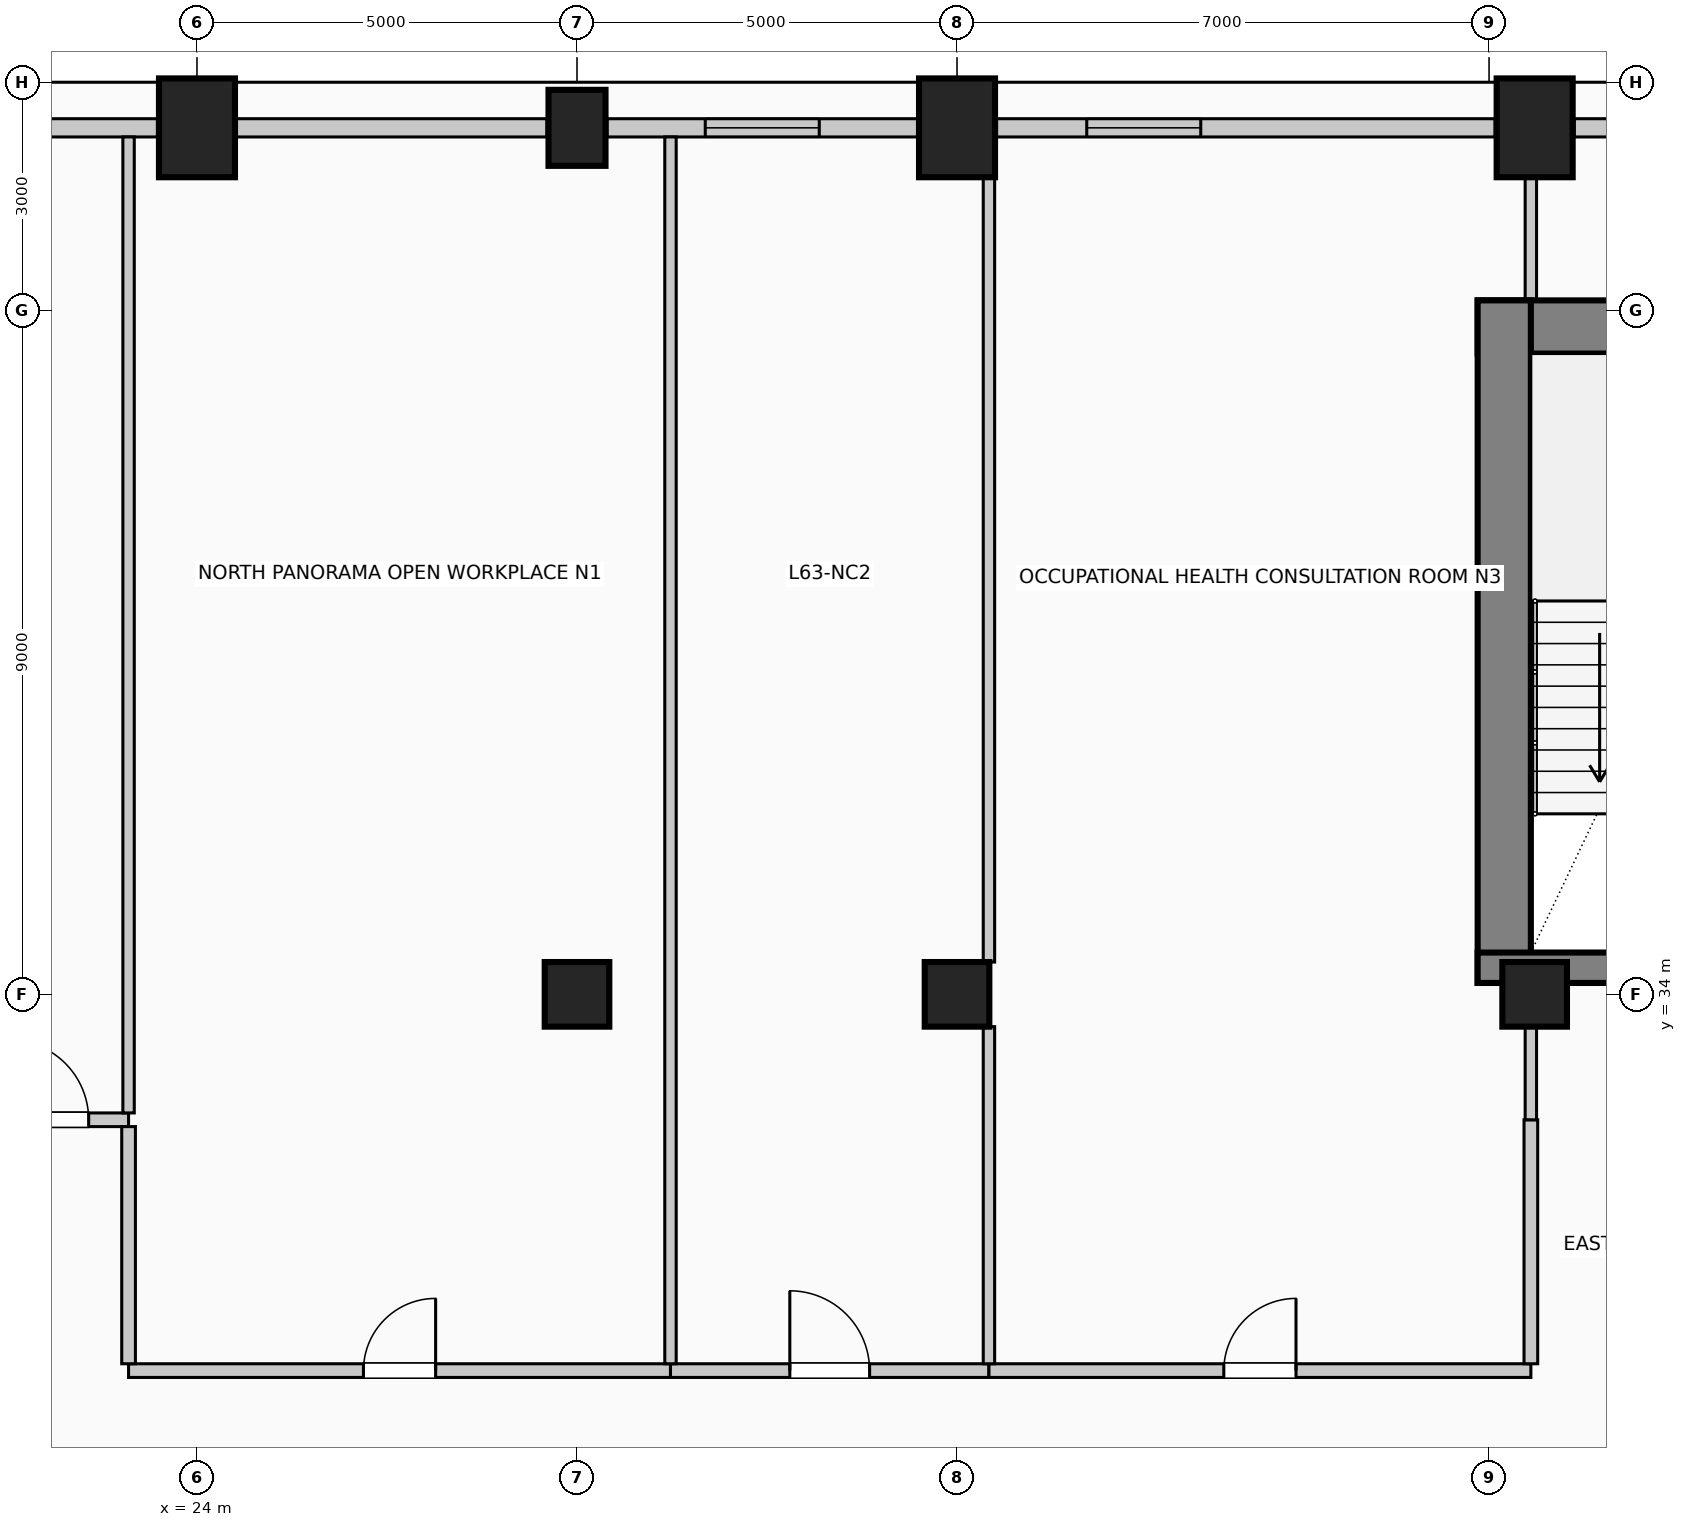
"""IFC4 building model, lengths in metres.
Left out: names, types, materials, properties, quantities, classifications, styles, units other than length and angle.
Written with IfcOpenShell. Run it as: python <this file> out.ifc"""

import sys

from ifc_helpers import new_model, si_unit, direction, frame, frame_2d, origin, origin_2d, place, context, subcontext, project, spatial, rectangle, circle, extrude, element, fill, save


model = new_model("IFC4")
c1 = context("Model", 3, precision=1e-05, world=origin(), true_north=direction((0.0, 1.0)))
c2 = subcontext(c1, "Body", "Model", "MODEL_VIEW")
j1 = project(units=[si_unit("LENGTHUNIT", "METRE"), si_unit("PLANEANGLEUNIT", "RADIAN")], contexts=[c1])
p1 = place(None, origin())
s1 = spatial("IfcSite", under=j1, at=p1, CompositionType="ELEMENT")
p2 = place(p1, origin())
s2 = spatial("IfcBuilding", under=s1, at=p2, CompositionType="ELEMENT")
p3 = place(p2, frame((0.0, 0.0, 260.6)))
s3 = spatial("IfcBuildingStorey", under=s2, at=p3, CompositionType="ELEMENT", Elevation=260.6)
p4 = place(p3, frame((40.85, 42.78, 0.0), z_axis=(0.0, 0.0, 1.0), x_axis=(1.0, 0.0, 0.0)))
e1 = element("IfcWall", 1, at=p4, inside=s3, PredefinedType="SHEAR", context=c2, shape_type="SweptSolid", body=[
    extrude(rectangle(XDim=14.3, YDim=0.7, at=frame_2d((7.15, 0.0))), origin(), (0.0, 0.0, 1.0), 4.0),
])
p5 = place(p3, frame((41.2, 34.15, 0.0), z_axis=(0.0, 0.0, 1.0), x_axis=(0.0, 1.0, 0.0)))
e2 = element("IfcWall", 2, at=p5, inside=s3, PredefinedType="SHEAR", context=c2, shape_type="SweptSolid", body=[
    extrude(rectangle(XDim=8.98, YDim=0.7, at=frame_2d((4.49, 0.0))), origin(), (0.0, 0.0, 1.0), 4.0),
])
p6 = place(p3, frame((40.85, 34.35, 0.0), z_axis=(0.0, 0.0, 1.0), x_axis=(1.0, 0.0, 0.0)))
e3 = element("IfcWall", 3, at=p6, inside=s3, PredefinedType="SHEAR", context=c2, shape_type="SweptSolid", body=[
    extrude(rectangle(XDim=4.86, YDim=0.4, at=frame_2d((2.43, 0.0))), origin(), (0.0, 0.0, 1.0), 4.0),
])
p7 = place(p6, frame((2.4, 0.0, 0.0)))
e4 = element("IfcOpeningElement", 4, at=p7, cuts=e3, PredefinedType="OPENING", context=c2, shape_type="SweptSolid", body=[
    extrude(rectangle(XDim=1.15, YDim=2.2, at=frame_2d((0.575, 1.1))), frame((0.0, 0.21, 0.0), z_axis=(0.0, -1.0, 0.0), x_axis=(1.0, 0.0, 0.0)), (0.0, 0.0, 1.0), 0.42),
])
p8 = place(p3, frame((24.0, 45.4, 0.0), z_axis=(0.0, 0.0, 1.0), x_axis=(1.0, 0.0, 0.0)))
e5 = element("IfcColumn", 5, at=p8, inside=s3, PredefinedType="COLUMN", context=c2, shape_type="SweptSolid", body=[
    extrude(rectangle(XDim=1.0, YDim=1.3, at=origin_2d()), origin(), (0.0, 0.0, 1.0), 4.0),
])
p9 = place(p3, frame((29.0, 45.4, 0.0), z_axis=(0.0, 0.0, 1.0), x_axis=(1.0, 0.0, 0.0)))
e6 = element("IfcColumn", 6, at=p9, inside=s3, PredefinedType="COLUMN", context=c2, shape_type="SweptSolid", body=[
    extrude(rectangle(XDim=0.75, YDim=1.0, at=origin_2d()), origin(), (0.0, 0.0, 1.0), 4.0),
])
for number, where, z_axis, x_axis in (
    (7, (34.0, 45.4, 0.0), (0.0, 0.0, 1.0), (1.0, 0.0, 0.0)),
    (8, (41.6, 45.4, 0.0), (0.0, 0.0, 1.0), (1.0, 0.0, 0.0)),
):
    element("IfcColumn", number, at=place(p3, frame(where, z_axis=z_axis, x_axis=x_axis)), inside=s3, PredefinedType="COLUMN", context=c2, shape_type="SweptSolid", body=[
        extrude(rectangle(XDim=1.0, YDim=1.3, at=origin_2d()), origin(), (0.0, 0.0, 1.0), 4.0),
    ])
for number, where, z_axis, x_axis in (
    (9, (29.0, 34.0, 0.0), (0.0, 0.0, 1.0), (1.0, 0.0, 0.0)),
    (10, (41.6, 34.0, 0.0), (0.0, 0.0, 1.0), (1.0, 0.0, 0.0)),
    (11, (34.0, 34.0, 0.0), (0.0, 0.0, 1.0), (1.0, 0.0, 0.0)),
):
    element("IfcColumn", number, at=place(p3, frame(where, z_axis=z_axis, x_axis=x_axis)), inside=s3, PredefinedType="COLUMN", context=c2, shape_type="SweptSolid", body=[
        extrude(circle(Radius=0.425, at=origin_2d()), origin(), (0.0, 0.0, 1.0), 4.0),
    ])
p10 = place(p3, frame((16.92, 45.4, 0.0), z_axis=(0.0, 0.0, 1.0), x_axis=(1.0, 0.0, 0.0)))
e12 = element("IfcWall", 12, at=p10, inside=s3, PredefinedType="SOLIDWALL", context=c2, shape_type="SweptSolid", body=[
    extrude(rectangle(XDim=6.56, YDim=0.24, at=frame_2d((3.28, 0.0))), origin(), (0.0, 0.0, 1.0), 3.0),
])
p11 = place(p10, frame((1.187, 0.0, 0.42)))
e13 = element("IfcOpeningElement", 13, at=p11, cuts=e12, PredefinedType="OPENING", context=c2, shape_type="SweptSolid", body=[
    extrude(rectangle(XDim=1.5, YDim=2.2, at=frame_2d((0.75, 1.1))), frame((0.0, 0.13, 0.0), z_axis=(0.0, -1.0, 0.0), x_axis=(1.0, 0.0, 0.0)), (0.0, 0.0, 1.0), 0.26),
])
p12 = place(p3, frame((24.52, 45.4, 0.0), z_axis=(0.0, 0.0, 1.0), x_axis=(1.0, 0.0, 0.0)))
e14 = element("IfcWall", 14, at=p12, inside=s3, PredefinedType="SOLIDWALL", context=c2, shape_type="SweptSolid", body=[
    extrude(rectangle(XDim=4.085, YDim=0.24, at=frame_2d((2.042, 0.0))), origin(), (0.0, 0.0, 1.0), 3.0),
])
p13 = place(p3, frame((29.395, 45.4, 0.0), z_axis=(0.0, 0.0, 1.0), x_axis=(1.0, 0.0, 0.0)))
e15 = element("IfcWall", 15, at=p13, inside=s3, PredefinedType="SOLIDWALL", context=c2, shape_type="SweptSolid", body=[
    extrude(rectangle(XDim=4.085, YDim=0.24, at=frame_2d((2.042, 0.0))), origin(), (0.0, 0.0, 1.0), 3.0),
])
p14 = place(p13, frame((1.292, 0.0, 0.42)))
e16 = element("IfcOpeningElement", 16, at=p14, cuts=e15, PredefinedType="OPENING", context=c2, shape_type="SweptSolid", body=[
    extrude(rectangle(XDim=1.5, YDim=2.2, at=frame_2d((0.75, 1.1))), frame((0.0, 0.13, 0.0), z_axis=(0.0, -1.0, 0.0), x_axis=(1.0, 0.0, 0.0)), (0.0, 0.0, 1.0), 0.26),
])
p15 = place(p3, frame((34.52, 45.4, 0.0), z_axis=(0.0, 0.0, 1.0), x_axis=(1.0, 0.0, 0.0)))
e17 = element("IfcWall", 17, at=p15, inside=s3, PredefinedType="SOLIDWALL", context=c2, shape_type="SweptSolid", body=[
    extrude(rectangle(XDim=6.56, YDim=0.24, at=frame_2d((3.28, 0.0))), origin(), (0.0, 0.0, 1.0), 3.0),
])
p16 = place(p15, frame((1.187, 0.0, 0.42)))
e18 = element("IfcOpeningElement", 18, at=p16, cuts=e17, PredefinedType="OPENING", context=c2, shape_type="SweptSolid", body=[
    extrude(rectangle(XDim=1.5, YDim=2.2, at=frame_2d((0.75, 1.1))), frame((0.0, 0.13, 0.0), z_axis=(0.0, -1.0, 0.0), x_axis=(1.0, 0.0, 0.0)), (0.0, 0.0, 1.0), 0.26),
])
p17 = place(p3, frame((42.12, 45.4, 0.0), z_axis=(0.0, 0.0, 1.0), x_axis=(1.0, 0.0, 0.0)))
e19 = element("IfcWall", 19, at=p17, inside=s3, PredefinedType="SOLIDWALL", context=c2, shape_type="SweptSolid", body=[
    extrude(rectangle(XDim=1.485, YDim=0.24, at=frame_2d((0.742, 0.0))), origin(), (0.0, 0.0, 1.0), 3.0),
])
p18 = place(p3, frame((23.1, 29.05, 0.0), z_axis=(0.0, 0.0, 1.0), x_axis=(1.0, 0.0, 0.0)))
e20 = element("IfcWall", 20, at=p18, inside=s3, PredefinedType="PARTITIONING", context=c2, shape_type="SweptSolid", body=[
    extrude(rectangle(XDim=7.13, YDim=0.18, at=frame_2d((3.565, 0.0))), origin(), (0.0, 0.0, 1.0), 3.75),
])
p19 = place(p18, frame((3.09, 0.0, 0.0)))
e21 = element("IfcOpeningElement", 21, at=p19, cuts=e20, PredefinedType="OPENING", context=c2, shape_type="SweptSolid", body=[
    extrude(rectangle(XDim=0.95, YDim=2.15, at=frame_2d((0.475, 1.075))), frame((0.0, 0.1, 0.0), z_axis=(0.0, -1.0, 0.0), x_axis=(1.0, 0.0, 0.0)), (0.0, 0.0, 1.0), 0.2),
])
p20 = place(p3, frame((30.23, 29.05, 0.0), z_axis=(0.0, 0.0, 1.0), x_axis=(1.0, 0.0, 0.0)))
e22 = element("IfcWall", 22, at=p20, inside=s3, PredefinedType="PARTITIONING", context=c2, shape_type="SweptSolid", body=[
    extrude(rectangle(XDim=4.19, YDim=0.18, at=frame_2d((2.095, 0.0))), origin(), (0.0, 0.0, 1.0), 3.75),
])
p21 = place(p20, frame((1.57, 0.0, 0.0)))
e23 = element("IfcOpeningElement", 23, at=p21, cuts=e22, PredefinedType="OPENING", context=c2, shape_type="SweptSolid", body=[
    extrude(rectangle(XDim=1.05, YDim=2.15, at=frame_2d((0.525, 1.075))), frame((0.0, 0.1, 0.0), z_axis=(0.0, -1.0, 0.0), x_axis=(1.0, 0.0, 0.0)), (0.0, 0.0, 1.0), 0.2),
])
p22 = place(p3, frame((34.42, 29.05, 0.0), z_axis=(0.0, 0.0, 1.0), x_axis=(1.0, 0.0, 0.0)))
e24 = element("IfcWall", 24, at=p22, inside=s3, PredefinedType="PARTITIONING", context=c2, shape_type="SweptSolid", body=[
    extrude(rectangle(XDim=7.13, YDim=0.18, at=frame_2d((3.565, 0.0))), origin(), (0.0, 0.0, 1.0), 3.75),
])
p23 = place(p22, frame((3.09, 0.0, 0.0)))
e25 = element("IfcOpeningElement", 25, at=p23, cuts=e24, PredefinedType="OPENING", context=c2, shape_type="SweptSolid", body=[
    extrude(rectangle(XDim=0.95, YDim=2.15, at=frame_2d((0.475, 1.075))), frame((0.0, 0.1, 0.0), z_axis=(0.0, -1.0, 0.0), x_axis=(1.0, 0.0, 0.0)), (0.0, 0.0, 1.0), 0.2),
])
p24 = place(p3, frame((21.0, 32.35, 0.0), z_axis=(0.0, 0.0, 1.0), x_axis=(1.0, 0.0, 0.0)))
e26 = element("IfcWall", 26, at=p24, inside=s3, PredefinedType="PARTITIONING", context=c2, shape_type="SweptSolid", body=[
    extrude(rectangle(XDim=2.1, YDim=0.18, at=frame_2d((1.05, 0.0))), origin(), (0.0, 0.0, 1.0), 3.75),
])
p25 = place(p24, frame((0.525, 0.0, 0.0)))
e27 = element("IfcOpeningElement", 27, at=p25, cuts=e26, PredefinedType="OPENING", context=c2, shape_type="SweptSolid", body=[
    extrude(rectangle(XDim=1.05, YDim=2.15, at=frame_2d((0.525, 1.075))), frame((0.0, 0.1, 0.0), z_axis=(0.0, -1.0, 0.0), x_axis=(1.0, 0.0, 0.0)), (0.0, 0.0, 1.0), 0.2),
])
p26 = place(p3, frame((23.1, 29.14, 0.0), z_axis=(0.0, 0.0, 1.0), x_axis=(0.0, 1.0, 0.0)))
e28 = element("IfcWall", 28, at=p26, inside=s3, PredefinedType="PARTITIONING", context=c2, shape_type="SweptSolid", body=[
    extrude(rectangle(XDim=3.12, YDim=0.18, at=frame_2d((1.56, 0.0))), origin(), (0.0, 0.0, 1.0), 3.75),
])
p27 = place(p3, frame((23.1, 32.44, 0.0), z_axis=(0.0, 0.0, 1.0), x_axis=(0.0, 1.0, 0.0)))
e29 = element("IfcWall", 29, at=p27, inside=s3, PredefinedType="PARTITIONING", context=c2, shape_type="SweptSolid", body=[
    extrude(rectangle(XDim=12.84, YDim=0.15, at=frame_2d((6.42, 0.0))), origin(), (0.0, 0.0, 1.0), 3.75),
])
p28 = place(p3, frame((30.23, 29.14, 0.0), z_axis=(0.0, 0.0, 1.0), x_axis=(0.0, 1.0, 0.0)))
e30 = element("IfcWall", 30, at=p28, inside=s3, PredefinedType="PARTITIONING", context=c2, shape_type="SweptSolid", body=[
    extrude(rectangle(XDim=16.14, YDim=0.15, at=frame_2d((8.07, 0.0))), origin(), (0.0, 0.0, 1.0), 3.75),
])
p29 = place(p3, frame((34.42, 29.14, 0.0), z_axis=(0.0, 0.0, 1.0), x_axis=(0.0, 1.0, 0.0)))
e31 = element("IfcWall", 31, at=p29, inside=s3, PredefinedType="PARTITIONING", context=c2, shape_type="SweptSolid", body=[
    extrude(rectangle(XDim=4.435, YDim=0.15, at=frame_2d((2.218, 0.0))), origin(), (0.0, 0.0, 1.0), 3.75),
])
p30 = place(p3, frame((34.42, 34.425, 0.0), z_axis=(0.0, 0.0, 1.0), x_axis=(0.0, 1.0, 0.0)))
e32 = element("IfcWall", 32, at=p30, inside=s3, PredefinedType="PARTITIONING", context=c2, shape_type="SweptSolid", body=[
    extrude(rectangle(XDim=10.325, YDim=0.15, at=frame_2d((5.163, 0.0))), origin(), (0.0, 0.0, 1.0), 3.75),
])
p31 = place(p3, frame((41.55, 29.14, 0.0), z_axis=(0.0, 0.0, 1.0), x_axis=(0.0, 1.0, 0.0)))
e33 = element("IfcWall", 33, at=p31, inside=s3, PredefinedType="PARTITIONING", context=c2, shape_type="SweptSolid", body=[
    extrude(rectangle(XDim=3.21, YDim=0.18, at=frame_2d((1.605, 0.0))), origin(), (0.0, 0.0, 1.0), 3.195),
])
p32 = place(p3, frame((41.55, 32.35, 0.0), z_axis=(0.0, 0.0, 1.0), x_axis=(0.0, 1.0, 0.0)))
e34 = element("IfcWall", 34, at=p32, inside=s3, PredefinedType="PARTITIONING", context=c2, shape_type="SweptSolid", body=[
    extrude(rectangle(XDim=1.225, YDim=0.15, at=frame_2d((0.612, 0.0))), origin(), (0.0, 0.0, 1.0), 3.195),
])
p33 = place(p3, frame((41.55, 43.13, 0.0), z_axis=(0.0, 0.0, 1.0), x_axis=(0.0, 1.0, 0.0)))
e35 = element("IfcWall", 35, at=p33, inside=s3, PredefinedType="PARTITIONING", context=c2, shape_type="SweptSolid", body=[
    extrude(rectangle(XDim=1.62, YDim=0.15, at=frame_2d((0.81, 0.0))), origin(), (0.0, 0.0, 1.0), 3.75),
])
p34 = place(p14, origin())
e36 = element("IfcWindow", 36, at=p34, inside=s3, PartitioningType="SINGLE_PANEL", PredefinedType="WINDOW", context=c2, shape_type="SweptSolid", body=[
    extrude(rectangle(XDim=1.5, YDim=2.2, at=frame_2d((0.75, 1.1))), frame((0.0, 0.03, 0.0), z_axis=(0.0, -1.0, 0.0), x_axis=(1.0, 0.0, 0.0)), (0.0, 0.0, 1.0), 0.06),
])
fill(e16, e36)
p35 = place(p16, origin())
e37 = element("IfcWindow", 37, at=p35, inside=s3, PartitioningType="SINGLE_PANEL", PredefinedType="WINDOW", context=c2, shape_type="SweptSolid", body=[
    extrude(rectangle(XDim=1.5, YDim=2.2, at=frame_2d((0.75, 1.1))), frame((0.0, 0.03, 0.0), z_axis=(0.0, -1.0, 0.0), x_axis=(1.0, 0.0, 0.0)), (0.0, 0.0, 1.0), 0.06),
])
fill(e18, e37)
p36 = place(p19, origin())
e38 = element("IfcDoor", 38, at=p36, inside=s3, OperationType="SINGLE_SWING_RIGHT", PredefinedType="DOOR", context=c2, shape_type="SweptSolid", body=[
    extrude(rectangle(XDim=0.95, YDim=2.15, at=frame_2d((0.475, 1.075))), frame((0.0, 0.025, 0.0), z_axis=(0.0, -1.0, 0.0), x_axis=(1.0, 0.0, 0.0)), (0.0, 0.0, 1.0), 0.05),
])
fill(e21, e38)
p37 = place(p21, origin())
e39 = element("IfcDoor", 39, at=p37, inside=s3, OperationType="SINGLE_SWING_LEFT", PredefinedType="DOOR", context=c2, shape_type="SweptSolid", body=[
    extrude(rectangle(XDim=1.05, YDim=2.15, at=frame_2d((0.525, 1.075))), frame((0.0, 0.025, 0.0), z_axis=(0.0, -1.0, 0.0), x_axis=(1.0, 0.0, 0.0)), (0.0, 0.0, 1.0), 0.05),
])
fill(e23, e39)
p38 = place(p23, origin())
e40 = element("IfcDoor", 40, at=p38, inside=s3, OperationType="SINGLE_SWING_RIGHT", PredefinedType="DOOR", context=c2, shape_type="SweptSolid", body=[
    extrude(rectangle(XDim=0.95, YDim=2.15, at=frame_2d((0.475, 1.075))), frame((0.0, 0.025, 0.0), z_axis=(0.0, -1.0, 0.0), x_axis=(1.0, 0.0, 0.0)), (0.0, 0.0, 1.0), 0.05),
])
fill(e25, e40)
p39 = place(p25, origin())
e41 = element("IfcDoor", 41, at=p39, inside=s3, OperationType="SINGLE_SWING_LEFT", PredefinedType="DOOR", context=c2, shape_type="SweptSolid", body=[
    extrude(rectangle(XDim=1.05, YDim=2.15, at=frame_2d((0.525, 1.075))), frame((0.0, 0.025, 0.0), z_axis=(0.0, -1.0, 0.0), x_axis=(1.0, 0.0, 0.0)), (0.0, 0.0, 1.0), 0.05),
])
fill(e27, e41)
save(model, sys.argv[1])
